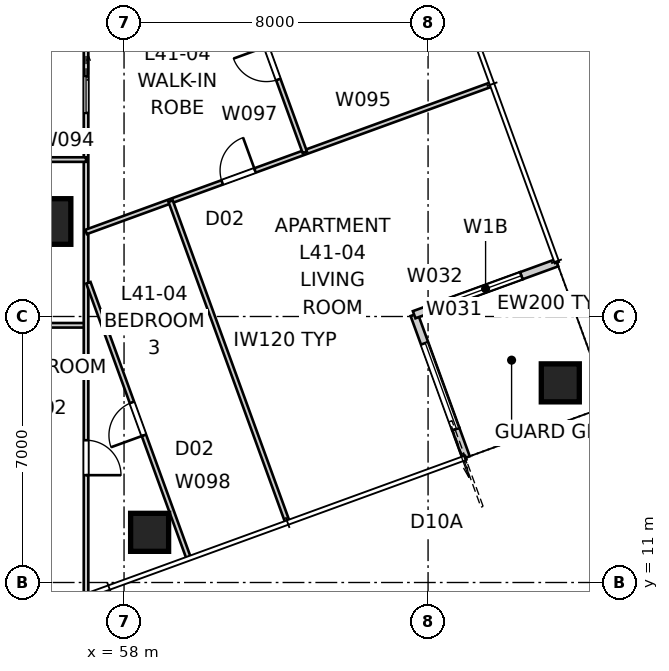
"""IFC4 building model, lengths in metres.
Left out: names, types, materials, properties, quantities, classifications, styles, units other than length and angle.
Written with IfcOpenShell. Run it as: python <this file> out.ifc"""

import sys

from ifc_helpers import new_model, si_unit, direction, frame, frame_2d, origin, origin_2d, place, context, subcontext, project, spatial, rectangle, extrude, element, fill, save


model = new_model("IFC4")
c1 = context("Model", 3, precision=1e-05, world=origin(), true_north=direction((0.0, 1.0)))
c2 = subcontext(c1, "Body", "Model", "MODEL_VIEW")
j1 = project(units=[si_unit("LENGTHUNIT", "METRE"), si_unit("PLANEANGLEUNIT", "RADIAN")], contexts=[c1])
p1 = place(None, origin())
s1 = spatial("IfcSite", under=j1, at=p1, CompositionType="ELEMENT")
p2 = place(p1, origin())
s2 = spatial("IfcBuilding", under=s1, at=p2, CompositionType="ELEMENT")
p3 = place(p2, frame((0.0, 0.0, 150.6)))
s3 = spatial("IfcBuildingStorey", under=s2, at=p3, CompositionType="ELEMENT", Elevation=150.6)
for number, where, z_axis, x_axis in (
    (1, (58.673, 12.32, 0.0), (0.0, 0.0, 1.0), (1.0, 0.0, 0.0)),
    (2, (69.479, 16.253, 0.0), (0.0, 0.0, 1.0), (1.0, 0.0, 0.0)),
):
    element("IfcColumn", number, at=place(p3, frame(where, z_axis=z_axis, x_axis=x_axis)), inside=s3, PredefinedType="COLUMN", context=c2, shape_type="SweptSolid", body=[
        extrude(rectangle(XDim=1.0, YDim=1.0, at=origin_2d()), origin(), (0.0, 0.0, 1.0), 3.4),
    ])
p4 = place(p3, frame((56.0, 20.5, 0.0), z_axis=(0.0, 0.0, 1.0), x_axis=(1.0, 0.0, 0.0)))
e3 = element("IfcColumn", 3, at=p4, inside=s3, PredefinedType="COLUMN", context=c2, shape_type="SweptSolid", body=[
    extrude(rectangle(XDim=1.2, YDim=1.2, at=origin_2d()), origin(), (0.0, 0.0, 1.0), 3.4),
])
p5 = place(p3, frame((67.002, 14.288, 0.0), z_axis=(0.0, 0.0, 1.0), x_axis=(-0.342110593602, 0.939659694648, 0.0)))
e4 = element("IfcWall", 4, at=p5, inside=s3, PredefinedType="SOLIDWALL", context=c2, shape_type="SweptSolid", body=[
    extrude(rectangle(XDim=0.8, YDim=0.2, at=frame_2d((0.4, 0.0))), origin(), (0.0, 0.0, 1.0), 3.25),
])
p6 = place(p3, frame((66.729, 15.04, 0.0), z_axis=(0.0, 0.0, 1.0), x_axis=(-0.342018703306, 0.939693144909, 0.0)))
e5 = element("IfcWall", 5, at=p6, inside=s3, PredefinedType="SOLIDWALL", context=c2, shape_type="SweptSolid", body=[
    extrude(rectangle(XDim=3.2, YDim=0.2, at=frame_2d((1.6, 0.0))), origin(), (0.0, 0.0, 1.0), 2.722),
])
p7 = place(p6, origin())
e6 = element("IfcOpeningElement", 6, at=p7, cuts=e5, PredefinedType="OPENING", context=c2, shape_type="SweptSolid", body=[
    extrude(rectangle(XDim=2.4, YDim=2.1, at=frame_2d((1.2, 1.05))), frame((0.0, 0.11, 0.0), z_axis=(0.0, -1.0, 0.0), x_axis=(1.0, 0.0, 0.0)), (0.0, 0.0, 1.0), 0.22),
])
p8 = place(p3, frame((65.634, 18.047, 0.0), z_axis=(0.0, 0.0, 1.0), x_axis=(0.939712609717, 0.341965219194, 0.0)))
e7 = element("IfcWall", 7, at=p8, inside=s3, PredefinedType="SOLIDWALL", context=c2, shape_type="SweptSolid", body=[
    extrude(rectangle(XDim=3.0, YDim=0.2, at=frame_2d((1.5, 0.0))), origin(), (0.0, 0.0, 1.0), 2.722),
])
p9 = place(p8, frame((1.0, 0.0, 0.45)))
e8 = element("IfcOpeningElement", 8, at=p9, cuts=e7, PredefinedType="OPENING", context=c2, shape_type="SweptSolid", body=[
    extrude(rectangle(XDim=2.0, YDim=1.8, at=frame_2d((1.0, 0.9))), frame((0.0, 0.11, 0.0), z_axis=(0.0, -1.0, 0.0), x_axis=(1.0, 0.0, 0.0)), (0.0, 0.0, 1.0), 0.22),
])
p10 = place(p3, frame((68.453, 19.073, 0.0), z_axis=(0.0, 0.0, 1.0), x_axis=(0.939686455819, 0.342037080957, 0.0)))
e9 = element("IfcWall", 9, at=p10, inside=s3, PredefinedType="SOLIDWALL", context=c2, shape_type="SweptSolid", body=[
    extrude(rectangle(XDim=1.0, YDim=0.2, at=frame_2d((0.5, 0.0))), origin(), (0.0, 0.0, 1.0), 3.25),
])
p11 = place(p3, frame((65.973, 28.812, 0.0), z_axis=(0.0, 0.0, 1.0), x_axis=(-0.939692090592, -0.342021600019, 0.0)))
e10 = element("IfcWall", 10, at=p11, inside=s3, PredefinedType="PARTITIONING", context=c2, shape_type="SweptSolid", body=[
    extrude(rectangle(XDim=12.949, YDim=0.25, at=frame_2d((6.474, 0.0))), origin(), (0.0, 0.0, 1.0), 3.25),
])
p12 = place(p3, frame((53.8, 17.769, 0.0), z_axis=(0.0, 0.0, 1.0), x_axis=(1.0, 0.0, 0.0)))
e11 = element("IfcWall", 11, at=p12, inside=s3, PredefinedType="PARTITIONING", context=c2, shape_type="SweptSolid", body=[
    extrude(rectangle(XDim=3.2, YDim=0.12, at=frame_2d((1.6, 0.0))), origin(), (0.0, 0.0, 1.0), 3.25),
])
p13 = place(p12, frame((1.12, 0.0, 0.0)))
e12 = element("IfcOpeningElement", 12, at=p13, cuts=e11, PredefinedType="OPENING", context=c2, shape_type="SweptSolid", body=[
    extrude(rectangle(XDim=0.96, YDim=2.1, at=frame_2d((0.48, 1.05))), frame((0.0, 0.07, 0.0), z_axis=(0.0, -1.0, 0.0), x_axis=(1.0, 0.0, 0.0)), (0.0, 0.0, 1.0), 0.14),
])
p14 = place(p3, frame((57.0, 48.8, 0.0), z_axis=(0.0, 0.0, 1.0), x_axis=(0.0, -1.0, 0.0)))
e13 = element("IfcWall", 13, at=p14, inside=s3, PredefinedType="PARTITIONING", context=c2, shape_type="SweptSolid", body=[
    extrude(rectangle(XDim=38.113, YDim=0.12, at=frame_2d((19.056, 0.0))), origin(), (0.0, 0.0, 1.0), 2.55),
])
p15 = place(p14, frame((4.198, 0.0, 0.0)))
e14 = element("IfcOpeningElement", 14, at=p15, cuts=e13, PredefinedType="OPENING", context=c2, shape_type="SweptSolid", body=[
    extrude(rectangle(XDim=0.92, YDim=2.34, at=frame_2d((0.46, 1.17))), frame((0.0, 0.07, 0.0), z_axis=(0.0, -1.0, 0.0), x_axis=(1.0, 0.0, 0.0)), (0.0, 0.0, 1.0), 0.14),
])
p16 = place(p14, frame((7.692, 0.0, 0.0)))
e15 = element("IfcOpeningElement", 15, at=p16, cuts=e13, PredefinedType="OPENING", context=c2, shape_type="SweptSolid", body=[
    extrude(rectangle(XDim=0.92, YDim=2.34, at=frame_2d((0.46, 1.17))), frame((0.0, 0.07, 0.0), z_axis=(0.0, -1.0, 0.0), x_axis=(1.0, 0.0, 0.0)), (0.0, 0.0, 1.0), 0.14),
])
p17 = place(p14, frame((20.162, 0.0, 0.0)))
e16 = element("IfcOpeningElement", 16, at=p17, cuts=e13, PredefinedType="OPENING", context=c2, shape_type="SweptSolid", body=[
    extrude(rectangle(XDim=0.92, YDim=2.34, at=frame_2d((0.46, 1.17))), frame((0.0, 0.07, 0.0), z_axis=(0.0, -1.0, 0.0), x_axis=(1.0, 0.0, 0.0)), (0.0, 0.0, 1.0), 0.14),
])
p18 = place(p14, frame((34.056, 0.0, 0.0)))
e17 = element("IfcOpeningElement", 17, at=p18, cuts=e13, PredefinedType="OPENING", context=c2, shape_type="SweptSolid", body=[
    extrude(rectangle(XDim=0.92, YDim=2.34, at=frame_2d((0.46, 1.17))), frame((0.0, 0.07, 0.0), z_axis=(0.0, -1.0, 0.0), x_axis=(1.0, 0.0, 0.0)), (0.0, 0.0, 1.0), 0.14),
])
p19 = place(p14, frame((24.482, 0.0, 0.0)))
e18 = element("IfcOpeningElement", 18, at=p19, cuts=e13, PredefinedType="OPENING", context=c2, shape_type="SweptSolid", body=[
    extrude(rectangle(XDim=0.96, YDim=2.1, at=frame_2d((0.48, 1.05))), frame((0.0, 0.07, 0.0), z_axis=(0.0, -1.0, 0.0), x_axis=(1.0, 0.0, 0.0)), (0.0, 0.0, 1.0), 0.14),
])
p20 = place(p3, frame((53.8, 22.129, 0.0), z_axis=(0.0, 0.0, 1.0), x_axis=(1.0, 0.0, 0.0)))
e19 = element("IfcWall", 19, at=p20, inside=s3, PredefinedType="PARTITIONING", context=c2, shape_type="SweptSolid", body=[
    extrude(rectangle(XDim=3.2, YDim=0.12, at=frame_2d((1.6, 0.0))), origin(), (0.0, 0.0, 1.0), 3.25),
])
p21 = place(p20, frame((0.52, 0.0, 0.0)))
e20 = element("IfcOpeningElement", 20, at=p21, cuts=e19, PredefinedType="OPENING", context=c2, shape_type="SweptSolid", body=[
    extrude(rectangle(XDim=0.96, YDim=2.1, at=frame_2d((0.48, 1.05))), frame((0.0, 0.07, 0.0), z_axis=(0.0, -1.0, 0.0), x_axis=(1.0, 0.0, 0.0)), (0.0, 0.0, 1.0), 0.14),
])
p22 = place(p3, frame((57.0, 20.225, 0.0), z_axis=(0.0, 0.0, 1.0), x_axis=(0.939693965364, 0.342016449105, 0.0)))
e21 = element("IfcWall", 21, at=p22, inside=s3, PredefinedType="PARTITIONING", context=c2, shape_type="SweptSolid", body=[
    extrude(rectangle(XDim=11.328, YDim=0.12, at=frame_2d((5.664, 0.0))), origin(), (0.0, 0.0, 1.0), 3.25),
])
p23 = place(p22, frame((3.812, 0.0, 0.0)))
e22 = element("IfcOpeningElement", 22, at=p23, cuts=e21, PredefinedType="OPENING", context=c2, shape_type="SweptSolid", body=[
    extrude(rectangle(XDim=0.92, YDim=2.34, at=frame_2d((0.46, 1.17))), frame((0.0, 0.07, 0.0), z_axis=(0.0, -1.0, 0.0), x_axis=(1.0, 0.0, 0.0)), (0.0, 0.0, 1.0), 0.14),
])
p24 = place(p3, frame((62.29, 12.615, 0.0), z_axis=(0.0, 0.0, 1.0), x_axis=(-0.342038393654, 0.939685978009, 0.0)))
e23 = element("IfcWall", 23, at=p24, inside=s3, PredefinedType="PARTITIONING", context=c2, shape_type="SweptSolid", body=[
    extrude(rectangle(XDim=8.96, YDim=0.12, at=frame_2d((4.48, 0.0))), origin(), (0.0, 0.0, 1.0), 3.25),
])
p25 = place(p3, frame((62.757, 22.32, 0.0), z_axis=(0.0, 0.0, 1.0), x_axis=(-0.341993964619, 0.939702148643, 0.0)))
e24 = element("IfcWall", 24, at=p25, inside=s3, PredefinedType="PARTITIONING", context=c2, shape_type="SweptSolid", body=[
    extrude(rectangle(XDim=5.0, YDim=0.12, at=frame_2d((2.5, 0.0))), origin(), (0.0, 0.0, 1.0), 3.25),
])
p26 = place(p25, frame((2.04, 0.0, 0.0)))
e25 = element("IfcOpeningElement", 25, at=p26, cuts=e24, PredefinedType="OPENING", context=c2, shape_type="SweptSolid", body=[
    extrude(rectangle(XDim=0.92, YDim=2.34, at=frame_2d((0.46, 1.17))), frame((0.0, 0.07, 0.0), z_axis=(0.0, -1.0, 0.0), x_axis=(1.0, 0.0, 0.0)), (0.0, 0.0, 1.0), 0.14),
])
p27 = place(p3, frame((59.689, 11.669, 0.0), z_axis=(0.0, 0.0, 1.0), x_axis=(-0.342003311293, 0.939698746974, 0.0)))
e26 = element("IfcWall", 26, at=p27, inside=s3, PredefinedType="PARTITIONING", context=c2, shape_type="SweptSolid", body=[
    extrude(rectangle(XDim=7.683, YDim=0.12, at=frame_2d((3.841, 0.0))), origin(), (0.0, 0.0, 1.0), 3.25),
])
p28 = place(p27, frame((3.411, 0.0, 0.0)))
e27 = element("IfcOpeningElement", 27, at=p28, cuts=e26, PredefinedType="OPENING", context=c2, shape_type="SweptSolid", body=[
    extrude(rectangle(XDim=0.92, YDim=2.34, at=frame_2d((0.46, 1.17))), frame((0.0, 0.07, 0.0), z_axis=(0.0, -1.0, 0.0), x_axis=(1.0, 0.0, 0.0)), (0.0, 0.0, 1.0), 0.14),
])
p29 = place(p7, origin())
e28 = element("IfcDoor", 28, at=p29, inside=s3, OperationType="SLIDING_TO_LEFT", PredefinedType="DOOR", context=c2, shape_type="SweptSolid", body=[
    extrude(rectangle(XDim=2.4, YDim=2.1, at=frame_2d((1.2, 1.05))), frame((0.0, 0.025, 0.0), z_axis=(0.0, -1.0, 0.0), x_axis=(1.0, 0.0, 0.0)), (0.0, 0.0, 1.0), 0.05),
])
fill(e6, e28)
p30 = place(p9, origin())
e29 = element("IfcWindow", 29, at=p30, inside=s3, PartitioningType="SINGLE_PANEL", PredefinedType="WINDOW", context=c2, shape_type="SweptSolid", body=[
    extrude(rectangle(XDim=2.0, YDim=1.8, at=frame_2d((1.0, 0.9))), frame((0.0, 0.03, 0.0), z_axis=(0.0, -1.0, 0.0), x_axis=(1.0, 0.0, 0.0)), (0.0, 0.0, 1.0), 0.06),
])
fill(e8, e29)
p31 = place(p18, origin())
e30 = element("IfcDoor", 30, at=p31, inside=s3, OperationType="SINGLE_SWING_RIGHT", PredefinedType="DOOR", context=c2, shape_type="SweptSolid", body=[
    extrude(rectangle(XDim=0.92, YDim=2.34, at=frame_2d((0.46, 1.17))), frame((0.0, 0.025, 0.0), z_axis=(0.0, -1.0, 0.0), x_axis=(1.0, 0.0, 0.0)), (0.0, 0.0, 1.0), 0.05),
])
fill(e17, e30)
p32 = place(p28, origin())
e31 = element("IfcDoor", 31, at=p32, inside=s3, OperationType="SINGLE_SWING_LEFT", PredefinedType="DOOR", context=c2, shape_type="SweptSolid", body=[
    extrude(rectangle(XDim=0.92, YDim=2.34, at=frame_2d((0.46, 1.17))), frame((0.0, 0.025, 0.0), z_axis=(0.0, -1.0, 0.0), x_axis=(1.0, 0.0, 0.0)), (0.0, 0.0, 1.0), 0.05),
])
fill(e27, e31)
p33 = place(p19, origin())
e32 = element("IfcDoor", 32, at=p33, inside=s3, OperationType="SLIDING_TO_LEFT", PredefinedType="DOOR", context=c2, shape_type="SweptSolid", body=[
    extrude(rectangle(XDim=0.96, YDim=2.1, at=frame_2d((0.48, 1.05))), frame((0.0, 0.025, 0.0), z_axis=(0.0, -1.0, 0.0), x_axis=(1.0, 0.0, 0.0)), (0.0, 0.0, 1.0), 0.05),
])
fill(e18, e32)
p34 = place(p26, origin())
e33 = element("IfcDoor", 33, at=p34, inside=s3, OperationType="SINGLE_SWING_RIGHT", PredefinedType="DOOR", context=c2, shape_type="SweptSolid", body=[
    extrude(rectangle(XDim=0.92, YDim=2.34, at=frame_2d((0.46, 1.17))), frame((0.0, 0.025, 0.0), z_axis=(0.0, -1.0, 0.0), x_axis=(1.0, 0.0, 0.0)), (0.0, 0.0, 1.0), 0.05),
])
fill(e25, e33)
p35 = place(p23, origin())
e34 = element("IfcDoor", 34, at=p35, inside=s3, OperationType="SINGLE_SWING_RIGHT", PredefinedType="DOOR", context=c2, shape_type="SweptSolid", body=[
    extrude(rectangle(XDim=0.92, YDim=2.34, at=frame_2d((0.46, 1.17))), frame((0.0, 0.025, 0.0), z_axis=(0.0, -1.0, 0.0), x_axis=(1.0, 0.0, 0.0)), (0.0, 0.0, 1.0), 0.05),
])
fill(e22, e34)
save(model, sys.argv[1])
